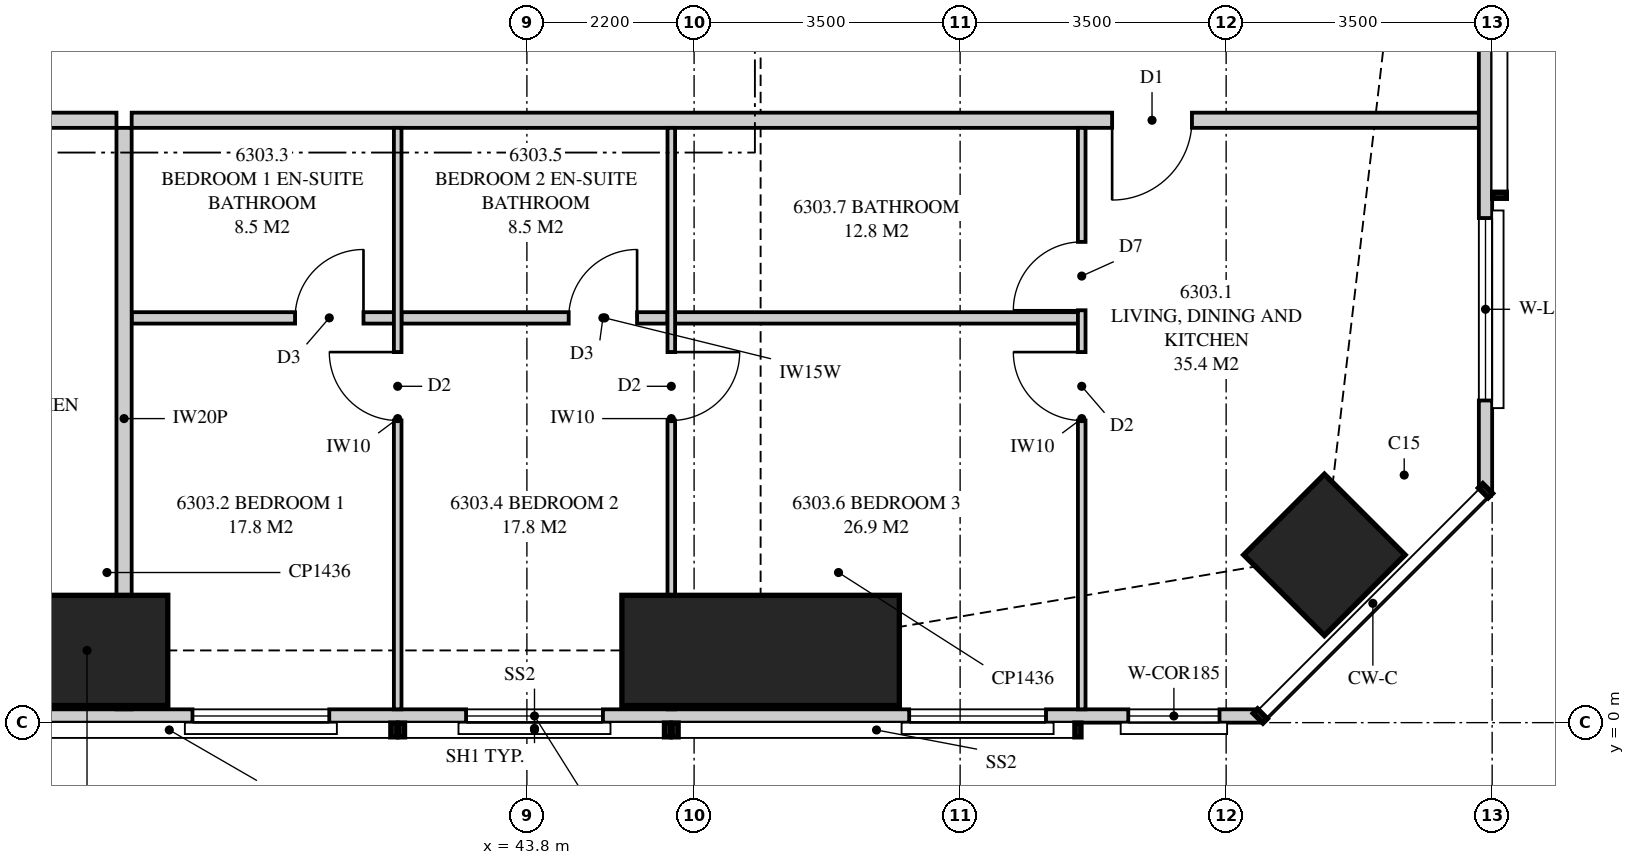
"""IFC4 building model, lengths in metres.
Left out: names, types, materials, properties, quantities, classifications, styles, units other than length and angle.
Written with IfcOpenShell. Run it as: python <this file> out.ifc"""

import sys

from ifc_helpers import new_model, si_unit, direction, frame, frame_2d, origin, origin_2d, place, context, subcontext, project, spatial, polyline, rectangle, outline, extrude, element, fill, save


model = new_model("IFC4")
c1 = context("Model", 3, precision=1e-05, world=origin(), true_north=direction((0.0, 1.0)))
c2 = subcontext(c1, "Body", "Model", "MODEL_VIEW")
j1 = project(units=[si_unit("LENGTHUNIT", "METRE"), si_unit("PLANEANGLEUNIT", "RADIAN")], contexts=[c1])
p1 = place(None, origin())
s1 = spatial("IfcSite", under=j1, at=p1, CompositionType="ELEMENT")
p2 = place(p1, origin())
s2 = spatial("IfcBuilding", under=s1, at=p2, CompositionType="ELEMENT")
p3 = place(p2, frame((0.0, 0.0, 231.95)))
s3 = spatial("IfcBuildingStorey", under=s2, at=p3, CompositionType="ELEMENT", Elevation=231.95)
for number, where, z_axis, x_axis in (
    (1, (37.25, 0.95, 0.0), (0.0, 0.0, 1.0), (0.0, 1.0, 0.0)),
    (2, (46.875, 0.95, 0.0), (0.0, 0.0, 1.0), (0.0, 1.0, 0.0)),
):
    element("IfcColumn", number, at=place(p3, frame(where, z_axis=z_axis, x_axis=x_axis)), inside=s3, PredefinedType="COLUMN", context=c2, shape_type="SweptSolid", body=[
        extrude(rectangle(XDim=1.45, YDim=3.65, at=origin_2d()), origin(), (0.0, 0.0, 1.0), 3.5),
    ])
p4 = place(p3, frame((54.293, 2.207, 0.0), z_axis=(0.0, 0.0, 1.0), x_axis=(0.707106781187, 0.707106781187, 0.0)))
e3 = element("IfcColumn", 3, at=p4, inside=s3, PredefinedType="COLUMN", context=c2, shape_type="SweptSolid", body=[
    extrude(rectangle(XDim=1.5, YDim=1.5, at=origin_2d()), origin(), (0.0, 0.0, 1.0), 3.5),
])
p5 = place(p3, frame((19.851, 0.087, 0.0), z_axis=(0.0, 0.0, 1.0), x_axis=(1.0, 0.0, 0.0)))
e4 = element("IfcWall", 4, at=p5, inside=s3, PredefinedType="SOLIDWALL", context=c2, shape_type="SweptSolid", body=[
    extrude(outline(polyline([(0.0, 0.0), (33.597, 0.0), (33.597, 3.26), (27.239, 3.26), (27.239, 2.3), (27.155, 2.3), (27.155, 3.26), (27.024, 3.26), (27.024, 2.3), (7.774, 2.3), (7.774, 3.26), (7.642, 3.26), (7.642, 2.3), (7.559, 2.3), (7.559, 3.26), (0.0, 3.26), (0.0, 0.0)])), frame((0.0, 0.087, 0.0), z_axis=(0.0, -1.0, 0.0), x_axis=(1.0, 0.0, 0.0)), (0.0, 0.0, 1.0), 0.175),
])
p6 = place(p5, frame((3.373, 0.0, 0.4)))
e5 = element("IfcOpeningElement", 5, at=p6, cuts=e4, PredefinedType="OPENING", context=c2, shape_type="SweptSolid", body=[
    extrude(rectangle(XDim=2.4, YDim=1.85, at=frame_2d((1.2, 0.925))), frame((0.0, 0.097, 0.0), z_axis=(0.0, -1.0, 0.0), x_axis=(1.0, 0.0, 0.0)), (0.0, 0.0, 1.0), 0.195),
])
p7 = place(p5, frame((10.349, 0.0, 0.4)))
e6 = element("IfcOpeningElement", 6, at=p7, cuts=e4, PredefinedType="OPENING", context=c2, shape_type="SweptSolid", body=[
    extrude(rectangle(XDim=1.8, YDim=1.85, at=frame_2d((0.9, 0.925))), frame((0.0, 0.097, 0.0), z_axis=(0.0, -1.0, 0.0), x_axis=(1.0, 0.0, 0.0)), (0.0, 0.0, 1.0), 0.195),
])
p8 = place(p5, frame((13.289, 0.0, 0.0)))
e7 = element("IfcOpeningElement", 7, at=p8, cuts=e4, PredefinedType="OPENING", context=c2, shape_type="SweptSolid", body=[
    extrude(rectangle(XDim=1.8, YDim=2.25, at=frame_2d((0.9, 1.125))), frame((0.0, 0.097, 0.0), z_axis=(0.0, -1.0, 0.0), x_axis=(1.0, 0.0, 0.0)), (0.0, 0.0, 1.0), 0.195),
])
p9 = place(p5, frame((19.549, 0.0, 0.4)))
e8 = element("IfcOpeningElement", 8, at=p9, cuts=e4, PredefinedType="OPENING", context=c2, shape_type="SweptSolid", body=[
    extrude(rectangle(XDim=1.8, YDim=1.85, at=frame_2d((0.9, 0.925))), frame((0.0, 0.097, 0.0), z_axis=(0.0, -1.0, 0.0), x_axis=(1.0, 0.0, 0.0)), (0.0, 0.0, 1.0), 0.195),
])
p10 = place(p5, frame((23.149, 0.0, 0.4)))
e9 = element("IfcOpeningElement", 9, at=p10, cuts=e4, PredefinedType="OPENING", context=c2, shape_type="SweptSolid", body=[
    extrude(rectangle(XDim=1.8, YDim=1.85, at=frame_2d((0.9, 0.925))), frame((0.0, 0.097, 0.0), z_axis=(0.0, -1.0, 0.0), x_axis=(1.0, 0.0, 0.0)), (0.0, 0.0, 1.0), 0.195),
])
p11 = place(p5, frame((28.979, 0.0, 0.4)))
e10 = element("IfcOpeningElement", 10, at=p11, cuts=e4, PredefinedType="OPENING", context=c2, shape_type="SweptSolid", body=[
    extrude(rectangle(XDim=1.8, YDim=1.85, at=frame_2d((0.9, 0.925))), frame((0.0, 0.097, 0.0), z_axis=(0.0, -1.0, 0.0), x_axis=(1.0, 0.0, 0.0)), (0.0, 0.0, 1.0), 0.195),
])
p12 = place(p5, frame((31.861, 0.0, 0.4)))
e11 = element("IfcOpeningElement", 11, at=p12, cuts=e4, PredefinedType="OPENING", context=c2, shape_type="SweptSolid", body=[
    extrude(rectangle(XDim=1.2, YDim=1.85, at=frame_2d((0.6, 0.925))), frame((0.0, 0.097, 0.0), z_axis=(0.0, -1.0, 0.0), x_axis=(1.0, 0.0, 0.0)), (0.0, 0.0, 1.0), 0.195),
])
p13 = place(p3, frame((56.413, 3.051, 0.0), z_axis=(0.0, 0.0, 1.0), x_axis=(0.0, 1.0, 0.0)))
e12 = element("IfcWall", 12, at=p13, inside=s3, PredefinedType="SOLIDWALL", context=c2, shape_type="SweptSolid", body=[
    extrude(outline(polyline([(0.0, 0.0), (27.897, 0.0), (27.897, 3.26), (22.157, 3.26), (22.157, 2.3), (22.092, 2.3), (22.092, 3.26), (21.949, 3.26), (21.949, 2.3), (9.949, 2.3), (9.949, 3.26), (9.858, 3.26), (9.858, 2.3), (9.688, 2.3), (9.688, 3.26), (0.0, 3.26), (0.0, 0.0)])), frame((0.0, 0.087, 0.0), z_axis=(0.0, -1.0, 0.0), x_axis=(1.0, 0.0, 0.0)), (0.0, 0.0, 1.0), 0.175),
])
p14 = place(p13, frame((1.187, 0.0, 0.4)))
e13 = element("IfcOpeningElement", 13, at=p14, cuts=e12, PredefinedType="OPENING", context=c2, shape_type="SweptSolid", body=[
    extrude(rectangle(XDim=2.4, YDim=1.85, at=frame_2d((1.2, 0.925))), frame((0.0, 0.097, 0.0), z_axis=(0.0, -1.0, 0.0), x_axis=(1.0, 0.0, 0.0)), (0.0, 0.0, 1.0), 0.195),
])
p15 = place(p13, frame((11.897, 0.0, 0.4)))
e14 = element("IfcOpeningElement", 14, at=p15, cuts=e12, PredefinedType="OPENING", context=c2, shape_type="SweptSolid", body=[
    extrude(rectangle(XDim=1.8, YDim=1.85, at=frame_2d((0.9, 0.925))), frame((0.0, 0.097, 0.0), z_axis=(0.0, -1.0, 0.0), x_axis=(1.0, 0.0, 0.0)), (0.0, 0.0, 1.0), 0.195),
])
p16 = place(p13, frame((14.824, 0.0, 0.0)))
e15 = element("IfcOpeningElement", 15, at=p16, cuts=e12, PredefinedType="OPENING", context=c2, shape_type="SweptSolid", body=[
    extrude(rectangle(XDim=1.8, YDim=2.25, at=frame_2d((0.9, 1.125))), frame((0.0, 0.097, 0.0), z_axis=(0.0, -1.0, 0.0), x_axis=(1.0, 0.0, 0.0)), (0.0, 0.0, 1.0), 0.195),
])
p17 = place(p13, frame((18.224, 0.0, 0.4)))
e16 = element("IfcOpeningElement", 16, at=p17, cuts=e12, PredefinedType="OPENING", context=c2, shape_type="SweptSolid", body=[
    extrude(rectangle(XDim=1.8, YDim=1.85, at=frame_2d((0.9, 0.925))), frame((0.0, 0.097, 0.0), z_axis=(0.0, -1.0, 0.0), x_axis=(1.0, 0.0, 0.0)), (0.0, 0.0, 1.0), 0.195),
])
p18 = place(p3, frame((38.5, 0.175, 0.0), z_axis=(0.0, 0.0, 1.0), x_axis=(0.0, 1.0, 0.0)))
e17 = element("IfcWall", 17, at=p18, inside=s3, PredefinedType="PARTITIONING", context=c2, shape_type="SweptSolid", body=[
    extrude(outline(polyline([(0.529, 2.3), (0.0, 2.3), (0.0, 0.0), (0.529, 0.0), (0.529, 0.281), (1.021, 0.281), (1.021, 0.0), (7.65, 0.0), (7.65, 2.66), (1.685, 2.66), (1.685, 2.3), (1.021, 2.3), (1.021, 2.019), (0.529, 2.019), (0.529, 2.3)])), frame((0.0, 0.1, 0.0), z_axis=(0.0, -1.0, 0.0), x_axis=(1.0, 0.0, 0.0)), (0.0, 0.0, 1.0), 0.2),
])
p19 = place(p3, frame((29.4, 7.925, 0.0), z_axis=(0.0, 0.0, 1.0), x_axis=(1.0, 0.0, 0.0)))
e18 = element("IfcWall", 18, at=p19, inside=s3, PredefinedType="PARTITIONING", context=c2, shape_type="SweptSolid", body=[
    extrude(outline(polyline([(0.0, 0.0), (9.0, 0.0), (9.0, 3.26), (9.0, 2.66), (6.54, 2.66), (6.54, 3.26), (0.0, 3.26), (0.0, 0.0)])), frame((0.0, 0.1, 0.0), z_axis=(0.0, -1.0, 0.0), x_axis=(1.0, 0.0, 0.0)), (0.0, 0.0, 1.0), 0.2),
])
p20 = place(p19, frame((4.0, 0.0, 0.0)))
e19 = element("IfcOpeningElement", 19, at=p20, cuts=e18, PredefinedType="OPENING", context=c2, shape_type="SweptSolid", body=[
    extrude(rectangle(XDim=1.05, YDim=2.2, at=frame_2d((0.525, 1.1))), frame((0.0, 0.11, 0.0), z_axis=(0.0, -1.0, 0.0), x_axis=(1.0, 0.0, 0.0)), (0.0, 0.0, 1.0), 0.22),
])
p21 = place(p3, frame((38.6, 7.925, 0.0), z_axis=(0.0, 0.0, 1.0), x_axis=(1.0, 0.0, 0.0)))
e20 = element("IfcWall", 20, at=p21, inside=s3, PredefinedType="PARTITIONING", context=c2, shape_type="SweptSolid", body=[
    extrude(outline(polyline([(0.0, 0.0), (17.725, 0.0), (17.725, 3.26), (17.275, 3.26), (17.275, 2.3), (15.443, 2.3), (15.443, 3.26), (9.585, 3.26), (9.585, 2.66), (6.965, 2.66), (6.965, 3.26), (0.0, 3.26), (0.0, 0.0)])), frame((0.0, 0.1, 0.0), z_axis=(0.0, -1.0, 0.0), x_axis=(1.0, 0.0, 0.0)), (0.0, 0.0, 1.0), 0.2),
])
p22 = place(p21, frame((12.9, 0.0, 0.0)))
e21 = element("IfcOpeningElement", 21, at=p22, cuts=e20, PredefinedType="OPENING", context=c2, shape_type="SweptSolid", body=[
    extrude(rectangle(XDim=1.05, YDim=2.2, at=frame_2d((0.525, 1.1))), frame((0.0, 0.11, 0.0), z_axis=(0.0, -1.0, 0.0), x_axis=(1.0, 0.0, 0.0)), (0.0, 0.0, 1.0), 0.22),
])
p23 = place(p3, frame((42.1, 0.175, 0.0), z_axis=(0.0, 0.0, 1.0), x_axis=(0.0, 1.0, 0.0)))
e22 = element("IfcWall", 22, at=p23, inside=s3, PredefinedType="PARTITIONING", context=c2, shape_type="SweptSolid", body=[
    extrude(outline(polyline([(0.0, 0.0), (7.65, 0.0), (7.65, 3.26), (1.635, 3.26), (1.635, 2.3), (0.0, 2.3), (0.0, 3.26), (0.0, 0.0)])), frame((0.0, 0.05, 0.0), z_axis=(0.0, -1.0, 0.0), x_axis=(1.0, 0.0, 0.0)), (0.0, 0.0, 1.0), 0.1),
])
p24 = place(p23, frame((3.8, 0.0, 0.0)))
e23 = element("IfcOpeningElement", 23, at=p24, cuts=e22, PredefinedType="OPENING", context=c2, shape_type="SweptSolid", body=[
    extrude(rectangle(XDim=0.9, YDim=2.1, at=frame_2d((0.45, 1.05))), frame((0.0, 0.06, 0.0), z_axis=(0.0, -1.0, 0.0), x_axis=(1.0, 0.0, 0.0)), (0.0, 0.0, 1.0), 0.12),
])
p25 = place(p3, frame((45.7, 0.175, 0.0), z_axis=(0.0, 0.0, 1.0), x_axis=(0.0, 1.0, 0.0)))
e24 = element("IfcWall", 24, at=p25, inside=s3, PredefinedType="PARTITIONING", context=c2, shape_type="SweptSolid", body=[
    extrude(outline(polyline([(0.529, 2.3), (0.0, 2.3), (0.0, 0.0), (0.529, 0.0), (0.529, 0.31), (1.021, 0.31), (1.021, 0.0), (7.65, 0.0), (7.65, 2.66), (1.635, 2.66), (1.635, 2.3), (1.021, 2.3), (1.021, 1.99), (0.529, 1.99), (0.529, 2.3)])), frame((0.0, 0.05, 0.0), z_axis=(0.0, -1.0, 0.0), x_axis=(1.0, 0.0, 0.0)), (0.0, 0.0, 1.0), 0.1),
])
p26 = place(p25, frame((3.8, 0.0, 0.0)))
e25 = element("IfcOpeningElement", 25, at=p26, cuts=e24, PredefinedType="OPENING", context=c2, shape_type="SweptSolid", body=[
    extrude(rectangle(XDim=0.9, YDim=2.1, at=frame_2d((0.45, 1.05))), frame((0.0, 0.06, 0.0), z_axis=(0.0, -1.0, 0.0), x_axis=(1.0, 0.0, 0.0)), (0.0, 0.0, 1.0), 0.12),
])
p27 = place(p3, frame((51.1, 0.175, 0.0), z_axis=(0.0, 0.0, 1.0), x_axis=(0.0, 1.0, 0.0)))
e26 = element("IfcWall", 26, at=p27, inside=s3, PredefinedType="PARTITIONING", context=c2, shape_type="SweptSolid", body=[
    extrude(outline(polyline([(0.0, 0.0), (7.65, 0.0), (7.65, 3.26), (2.363, 3.26), (2.363, 2.3), (0.619, 2.3), (0.619, 3.26), (0.0, 3.26), (0.0, 0.0)])), frame((0.0, 0.05, 0.0), z_axis=(0.0, -1.0, 0.0), x_axis=(1.0, 0.0, 0.0)), (0.0, 0.0, 1.0), 0.1),
])
p28 = place(p27, frame((3.8, 0.0, 0.0)))
e27 = element("IfcOpeningElement", 27, at=p28, cuts=e26, PredefinedType="OPENING", context=c2, shape_type="SweptSolid", body=[
    extrude(rectangle(XDim=0.9, YDim=2.1, at=frame_2d((0.45, 1.05))), frame((0.0, 0.06, 0.0), z_axis=(0.0, -1.0, 0.0), x_axis=(1.0, 0.0, 0.0)), (0.0, 0.0, 1.0), 0.12),
])
p29 = place(p27, frame((5.25, 0.0, 0.0)))
e28 = element("IfcOpeningElement", 28, at=p29, cuts=e26, PredefinedType="OPENING", context=c2, shape_type="SweptSolid", body=[
    extrude(rectangle(XDim=0.9, YDim=2.1, at=frame_2d((0.45, 1.05))), frame((0.0, 0.06, 0.0), z_axis=(0.0, -1.0, 0.0), x_axis=(1.0, 0.0, 0.0)), (0.0, 0.0, 1.0), 0.12),
])
p30 = place(p3, frame((38.6, 5.325, 0.0), z_axis=(0.0, 0.0, 1.0), x_axis=(1.0, 0.0, 0.0)))
e29 = element("IfcWall", 29, at=p30, inside=s3, PredefinedType="PLUMBINGWALL", context=c2, shape_type="SweptSolid", body=[
    extrude(rectangle(XDim=3.45, YDim=0.15, at=frame_2d((1.725, 0.0))), origin(), (0.0, 0.0, 1.0), 3.26),
])
p31 = place(p30, frame((2.15, 0.0, 0.0)))
e30 = element("IfcOpeningElement", 30, at=p31, cuts=e29, PredefinedType="OPENING", context=c2, shape_type="SweptSolid", body=[
    extrude(rectangle(XDim=0.9, YDim=2.1, at=frame_2d((0.45, 1.05))), frame((0.0, 0.085, 0.0), z_axis=(0.0, -1.0, 0.0), x_axis=(1.0, 0.0, 0.0)), (0.0, 0.0, 1.0), 0.17),
])
p32 = place(p3, frame((42.15, 5.325, 0.0), z_axis=(0.0, 0.0, 1.0), x_axis=(1.0, 0.0, 0.0)))
e31 = element("IfcWall", 31, at=p32, inside=s3, PredefinedType="PLUMBINGWALL", context=c2, shape_type="SweptSolid", body=[
    extrude(outline(polyline([(0.0, 0.0), (3.5, 0.0), (3.5, 3.26), (3.5, 2.66), (3.44, 2.66), (3.44, 3.26), (0.0, 3.26), (0.0, 0.0)])), frame((0.0, 0.075, 0.0), z_axis=(0.0, -1.0, 0.0), x_axis=(1.0, 0.0, 0.0)), (0.0, 0.0, 1.0), 0.15),
])
p33 = place(p32, frame((2.2, 0.0, 0.0)))
e32 = element("IfcOpeningElement", 32, at=p33, cuts=e31, PredefinedType="OPENING", context=c2, shape_type="SweptSolid", body=[
    extrude(rectangle(XDim=0.9, YDim=2.1, at=frame_2d((0.45, 1.05))), frame((0.0, 0.085, 0.0), z_axis=(0.0, -1.0, 0.0), x_axis=(1.0, 0.0, 0.0)), (0.0, 0.0, 1.0), 0.17),
])
p34 = place(p3, frame((45.75, 5.325, 0.0), z_axis=(0.0, 0.0, 1.0), x_axis=(1.0, 0.0, 0.0)))
e33 = element("IfcWall", 33, at=p34, inside=s3, PredefinedType="PLUMBINGWALL", context=c2, shape_type="SweptSolid", body=[
    extrude(outline(polyline([(0.0, 0.0), (5.3, 0.0), (5.3, 3.26), (2.41, 3.26), (2.41, 2.66), (0.0, 2.66), (0.0, 3.26), (0.0, 0.0)])), frame((0.0, 0.075, 0.0), z_axis=(0.0, -1.0, 0.0), x_axis=(1.0, 0.0, 0.0)), (0.0, 0.0, 1.0), 0.15),
])
p35 = place(p9, origin())
e34 = element("IfcWindow", 34, at=p35, inside=s3, PartitioningType="SINGLE_PANEL", PredefinedType="WINDOW", context=c2, shape_type="SweptSolid", body=[
    extrude(rectangle(XDim=1.8, YDim=1.85, at=frame_2d((0.9, 0.925))), frame((0.0, 0.03, 0.0), z_axis=(0.0, -1.0, 0.0), x_axis=(1.0, 0.0, 0.0)), (0.0, 0.0, 1.0), 0.06),
])
fill(e8, e34)
p36 = place(p10, origin())
e35 = element("IfcWindow", 35, at=p36, inside=s3, PartitioningType="SINGLE_PANEL", PredefinedType="WINDOW", context=c2, shape_type="SweptSolid", body=[
    extrude(rectangle(XDim=1.8, YDim=1.85, at=frame_2d((0.9, 0.925))), frame((0.0, 0.03, 0.0), z_axis=(0.0, -1.0, 0.0), x_axis=(1.0, 0.0, 0.0)), (0.0, 0.0, 1.0), 0.06),
])
fill(e9, e35)
p37 = place(p11, origin())
e36 = element("IfcWindow", 36, at=p37, inside=s3, PartitioningType="SINGLE_PANEL", PredefinedType="WINDOW", context=c2, shape_type="SweptSolid", body=[
    extrude(rectangle(XDim=1.8, YDim=1.85, at=frame_2d((0.9, 0.925))), frame((0.0, 0.03, 0.0), z_axis=(0.0, -1.0, 0.0), x_axis=(1.0, 0.0, 0.0)), (0.0, 0.0, 1.0), 0.06),
])
fill(e10, e36)
p38 = place(p12, origin())
e37 = element("IfcWindow", 37, at=p38, inside=s3, PartitioningType="SINGLE_PANEL", PredefinedType="WINDOW", context=c2, shape_type="SweptSolid", body=[
    extrude(rectangle(XDim=1.2, YDim=1.85, at=frame_2d((0.6, 0.925))), frame((0.0, 0.03, 0.0), z_axis=(0.0, -1.0, 0.0), x_axis=(1.0, 0.0, 0.0)), (0.0, 0.0, 1.0), 0.06),
])
fill(e11, e37)
p39 = place(p14, origin())
e38 = element("IfcWindow", 38, at=p39, inside=s3, PartitioningType="SINGLE_PANEL", PredefinedType="WINDOW", context=c2, shape_type="SweptSolid", body=[
    extrude(rectangle(XDim=2.4, YDim=1.85, at=frame_2d((1.2, 0.925))), frame((0.0, 0.03, 0.0), z_axis=(0.0, -1.0, 0.0), x_axis=(1.0, 0.0, 0.0)), (0.0, 0.0, 1.0), 0.06),
])
fill(e13, e38)
p40 = place(p22, frame((1.05, 0.0, 0.0), z_axis=(0.0, 0.0, 1.0), x_axis=(-1.0, 0.0, 0.0)))
e39 = element("IfcDoor", 39, at=p40, inside=s3, OperationType="SINGLE_SWING_RIGHT", PredefinedType="DOOR", context=c2, shape_type="SweptSolid", body=[
    extrude(rectangle(XDim=1.05, YDim=2.2, at=frame_2d((0.525, 1.1))), frame((0.0, 0.025, 0.0), z_axis=(0.0, -1.0, 0.0), x_axis=(1.0, 0.0, 0.0)), (0.0, 0.0, 1.0), 0.05),
])
fill(e21, e39)
p41 = place(p24, origin())
e40 = element("IfcDoor", 40, at=p41, inside=s3, OperationType="SINGLE_SWING_RIGHT", PredefinedType="DOOR", context=c2, shape_type="SweptSolid", body=[
    extrude(rectangle(XDim=0.9, YDim=2.1, at=frame_2d((0.45, 1.05))), frame((0.0, 0.025, 0.0), z_axis=(0.0, -1.0, 0.0), x_axis=(1.0, 0.0, 0.0)), (0.0, 0.0, 1.0), 0.05),
])
fill(e23, e40)
p42 = place(p31, origin())
e41 = element("IfcDoor", 41, at=p42, inside=s3, OperationType="SINGLE_SWING_RIGHT", PredefinedType="DOOR", context=c2, shape_type="SweptSolid", body=[
    extrude(rectangle(XDim=0.9, YDim=2.1, at=frame_2d((0.45, 1.05))), frame((0.0, 0.025, 0.0), z_axis=(0.0, -1.0, 0.0), x_axis=(1.0, 0.0, 0.0)), (0.0, 0.0, 1.0), 0.05),
])
fill(e30, e41)
p43 = place(p26, frame((0.9, 0.0, 0.0), z_axis=(0.0, 0.0, 1.0), x_axis=(-1.0, 0.0, 0.0)))
e42 = element("IfcDoor", 42, at=p43, inside=s3, OperationType="SINGLE_SWING_LEFT", PredefinedType="DOOR", context=c2, shape_type="SweptSolid", body=[
    extrude(rectangle(XDim=0.9, YDim=2.1, at=frame_2d((0.45, 1.05))), frame((0.0, 0.025, 0.0), z_axis=(0.0, -1.0, 0.0), x_axis=(1.0, 0.0, 0.0)), (0.0, 0.0, 1.0), 0.05),
])
fill(e25, e42)
p44 = place(p33, origin())
e43 = element("IfcDoor", 43, at=p44, inside=s3, OperationType="SINGLE_SWING_RIGHT", PredefinedType="DOOR", context=c2, shape_type="SweptSolid", body=[
    extrude(rectangle(XDim=0.9, YDim=2.1, at=frame_2d((0.45, 1.05))), frame((0.0, 0.025, 0.0), z_axis=(0.0, -1.0, 0.0), x_axis=(1.0, 0.0, 0.0)), (0.0, 0.0, 1.0), 0.05),
])
fill(e32, e43)
p45 = place(p28, origin())
e44 = element("IfcDoor", 44, at=p45, inside=s3, OperationType="SINGLE_SWING_RIGHT", PredefinedType="DOOR", context=c2, shape_type="SweptSolid", body=[
    extrude(rectangle(XDim=0.9, YDim=2.1, at=frame_2d((0.45, 1.05))), frame((0.0, 0.025, 0.0), z_axis=(0.0, -1.0, 0.0), x_axis=(1.0, 0.0, 0.0)), (0.0, 0.0, 1.0), 0.05),
])
fill(e27, e44)
p46 = place(p29, origin())
e45 = element("IfcDoor", 45, at=p46, inside=s3, OperationType="SINGLE_SWING_LEFT", PredefinedType="DOOR", context=c2, shape_type="SweptSolid", body=[
    extrude(rectangle(XDim=0.9, YDim=2.1, at=frame_2d((0.45, 1.05))), frame((0.0, 0.025, 0.0), z_axis=(0.0, -1.0, 0.0), x_axis=(1.0, 0.0, 0.0)), (0.0, 0.0, 1.0), 0.05),
])
fill(e28, e45)
save(model, sys.argv[1])
